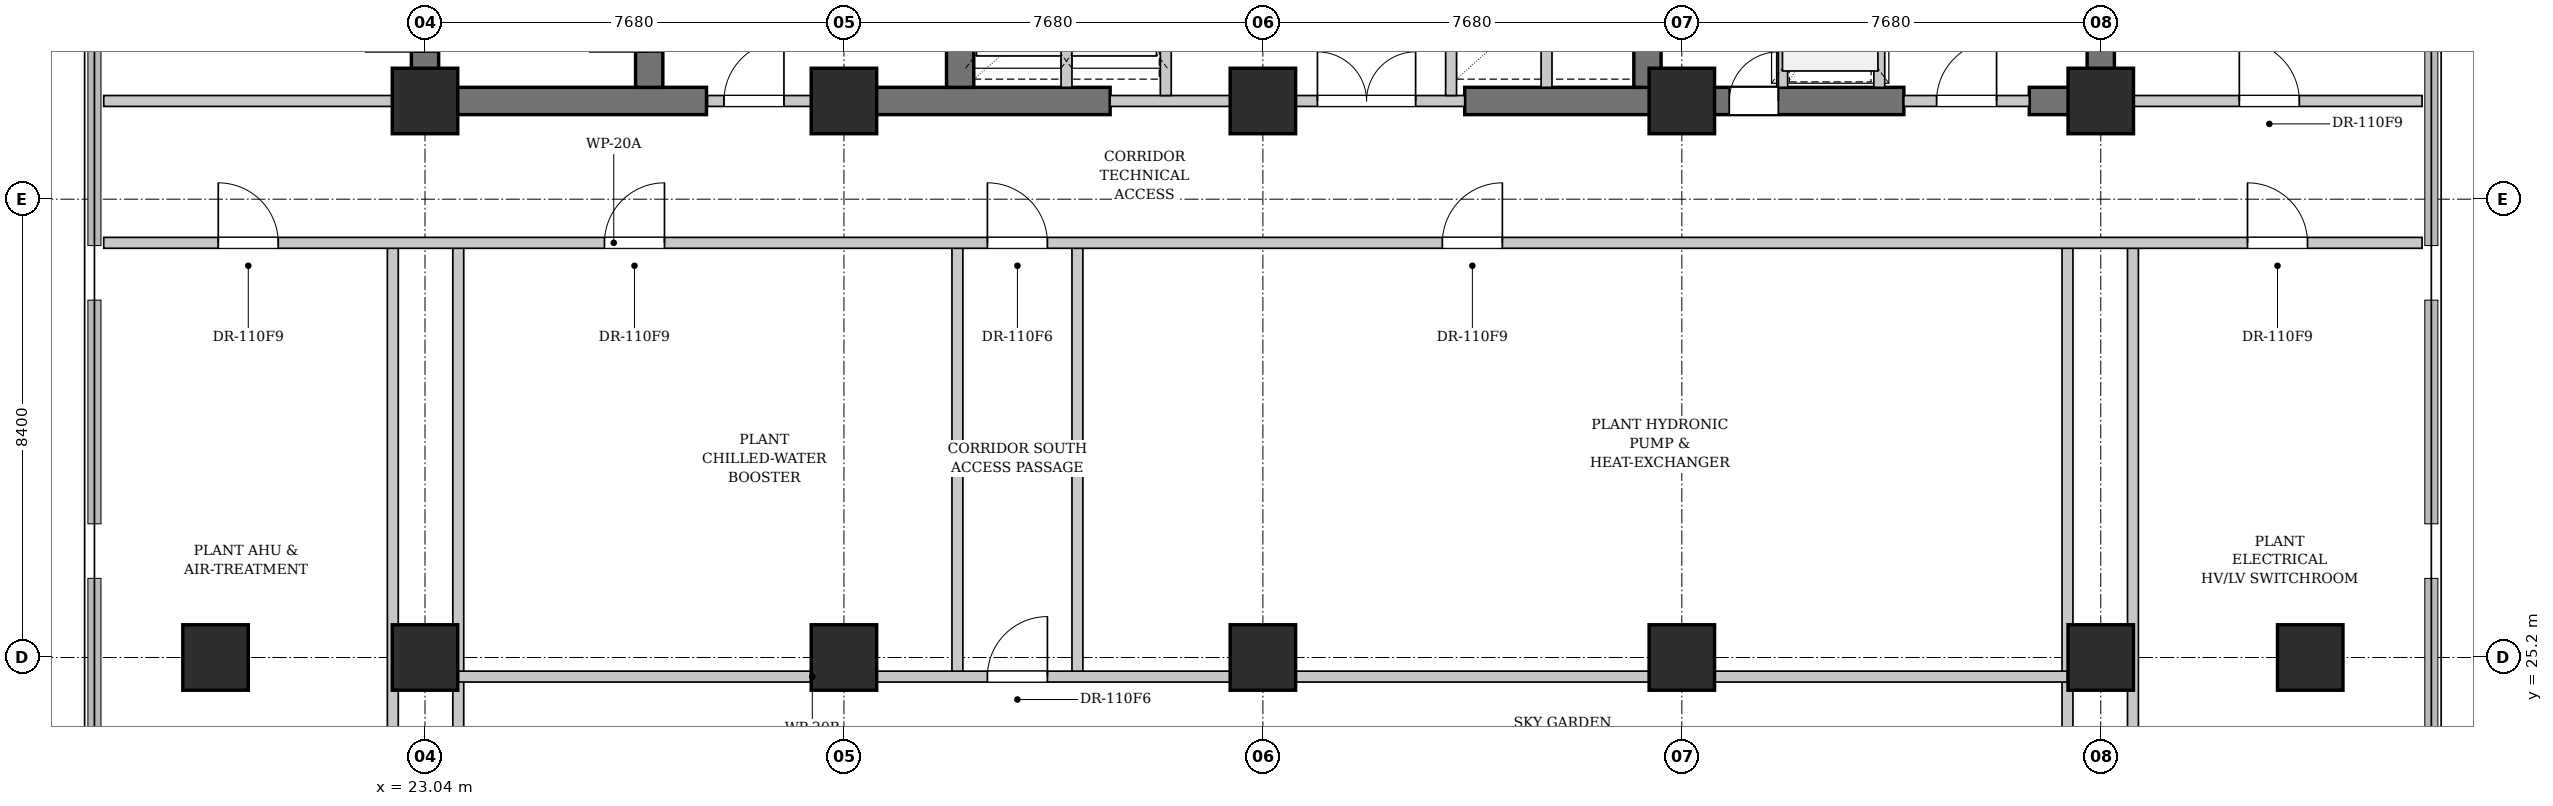
"""IFC4 building model, lengths in metres.
Left out: names, types, materials, properties, quantities, classifications, styles, units other than length and angle.
Written with IfcOpenShell. Run it as: python <this file> out.ifc"""

import sys

from ifc_helpers import new_model, si_unit, direction, frame, frame_2d, origin, origin_2d, place, context, subcontext, project, spatial, rectangle, extrude, element, fill, save


model = new_model("IFC4")
c1 = context("Model", 3, precision=1e-05, world=origin(), true_north=direction((0.0, 1.0)))
c2 = subcontext(c1, "Body", "Model", "MODEL_VIEW")
j1 = project(units=[si_unit("LENGTHUNIT", "METRE"), si_unit("PLANEANGLEUNIT", "RADIAN")], contexts=[c1])
p1 = place(None, origin())
s1 = spatial("IfcSite", under=j1, at=p1, CompositionType="ELEMENT")
p2 = place(p1, origin())
s2 = spatial("IfcBuilding", under=s1, at=p2, CompositionType="ELEMENT")
p3 = place(p2, frame((0.0, 0.0, 78.0)))
s3 = spatial("IfcBuildingStorey", under=s2, at=p3, CompositionType="ELEMENT", Elevation=78.0)
p4 = place(p3, frame((22.79, 35.4, 0.0), z_axis=(0.0, 0.0, 1.0), x_axis=(1.0, 0.0, 0.0)))
e1 = element("IfcWall", 1, at=p4, inside=s3, PredefinedType="SHEAR", context=c2, shape_type="SweptSolid", body=[
    extrude(rectangle(XDim=5.41, YDim=0.5, at=frame_2d((2.705, 0.0))), origin(), (0.0, 0.0, 1.0), 3.68),
])
p5 = place(p3, frame((30.72, 35.4, 0.0), z_axis=(0.0, 0.0, 1.0), x_axis=(1.0, 0.0, 0.0)))
e2 = element("IfcWall", 2, at=p5, inside=s3, PredefinedType="SHEAR", context=c2, shape_type="SweptSolid", body=[
    extrude(rectangle(XDim=4.88, YDim=0.5, at=frame_2d((2.44, 0.0))), origin(), (0.0, 0.0, 1.0), 3.68),
])
p6 = place(p3, frame((42.1, 35.4, 0.0), z_axis=(0.0, 0.0, 1.0), x_axis=(1.0, 0.0, 0.0)))
e3 = element("IfcWall", 3, at=p6, inside=s3, PredefinedType="SHEAR", context=c2, shape_type="SweptSolid", body=[
    extrude(rectangle(XDim=8.05, YDim=0.5, at=frame_2d((4.025, 0.0))), origin(), (0.0, 0.0, 1.0), 3.68),
])
p7 = place(p6, frame((4.85, 0.0, 0.0)))
e4 = element("IfcOpeningElement", 4, at=p7, cuts=e3, PredefinedType="OPENING", context=c2, shape_type="SweptSolid", body=[
    extrude(rectangle(XDim=0.9, YDim=2.15, at=frame_2d((0.45, 1.075))), frame((0.0, 0.26, 0.0), z_axis=(0.0, -1.0, 0.0), x_axis=(1.0, 0.0, 0.0)), (0.0, 0.0, 1.0), 0.52),
])
p8 = place(p3, frame((52.45, 35.4, 0.0), z_axis=(0.0, 0.0, 1.0), x_axis=(1.0, 0.0, 0.0)))
e5 = element("IfcWall", 5, at=p8, inside=s3, PredefinedType="SHEAR", context=c2, shape_type="SweptSolid", body=[
    extrude(rectangle(XDim=1.56, YDim=0.5, at=frame_2d((0.78, 0.0))), origin(), (0.0, 0.0, 1.0), 3.68),
])
p9 = place(p3, frame((23.04, 35.65, 0.0), z_axis=(0.0, 0.0, 1.0), x_axis=(0.0, 1.0, 0.0)))
e6 = element("IfcWall", 6, at=p9, inside=s3, PredefinedType="SHEAR", context=c2, shape_type="SweptSolid", body=[
    extrude(rectangle(XDim=10.3, YDim=0.5, at=frame_2d((5.15, 0.0))), origin(), (0.0, 0.0, 1.0), 3.68),
])
p10 = place(p9, frame((0.65, 0.0, 0.0)))
e7 = element("IfcOpeningElement", 7, at=p10, cuts=e6, PredefinedType="OPENING", context=c2, shape_type="SweptSolid", body=[
    extrude(rectangle(XDim=1.1, YDim=2.15, at=frame_2d((0.55, 1.075))), frame((0.0, 0.26, 0.0), z_axis=(0.0, -1.0, 0.0), x_axis=(1.0, 0.0, 0.0)), (0.0, 0.0, 1.0), 0.52),
])
p11 = place(p3, frame((27.15, 35.65, 0.0), z_axis=(0.0, 0.0, 1.0), x_axis=(0.0, 1.0, 0.0)))
e8 = element("IfcWall", 8, at=p11, inside=s3, PredefinedType="SHEAR", context=c2, shape_type="SweptSolid", body=[
    extrude(rectangle(XDim=10.3, YDim=0.5, at=frame_2d((5.15, 0.0))), origin(), (0.0, 0.0, 1.0), 3.68),
])
p12 = place(p11, frame((0.65, 0.0, 0.0)))
e9 = element("IfcOpeningElement", 9, at=p12, cuts=e8, PredefinedType="OPENING", context=c2, shape_type="SweptSolid", body=[
    extrude(rectangle(XDim=1.1, YDim=2.15, at=frame_2d((0.55, 1.075))), frame((0.0, 0.26, 0.0), z_axis=(0.0, -1.0, 0.0), x_axis=(1.0, 0.0, 0.0)), (0.0, 0.0, 1.0), 0.52),
])
for number, where, z_axis, x_axis in (
    (10, (32.85, 35.65, 0.0), (0.0, 0.0, 1.0), (0.0, 1.0, 0.0)),
    (11, (45.45, 35.65, 0.0), (0.0, 0.0, 1.0), (0.0, 1.0, 0.0)),
    (12, (53.76, 35.65, 0.0), (0.0, 0.0, 1.0), (0.0, 1.0, 0.0)),
):
    element("IfcWall", number, at=place(p3, frame(where, z_axis=z_axis, x_axis=x_axis)), inside=s3, PredefinedType="SHEAR", context=c2, shape_type="SweptSolid", body=[
        extrude(rectangle(XDim=10.3, YDim=0.5, at=frame_2d((5.15, 0.0))), origin(), (0.0, 0.0, 1.0), 3.68),
    ])
for number, where, z_axis, x_axis in (
    (13, (23.04, 35.4, 0.0), (0.0, 0.0, 1.0), (1.0, 0.0, 0.0)),
    (14, (23.04, 25.2, 0.0), (0.0, 0.0, 1.0), (1.0, 0.0, 0.0)),
    (15, (30.72, 35.4, 0.0), (0.0, 0.0, 1.0), (1.0, 0.0, 0.0)),
    (16, (30.72, 25.2, 0.0), (0.0, 0.0, 1.0), (1.0, 0.0, 0.0)),
    (17, (38.4, 35.4, 0.0), (0.0, 0.0, 1.0), (1.0, 0.0, 0.0)),
    (18, (38.4, 25.2, 0.0), (0.0, 0.0, 1.0), (1.0, 0.0, 0.0)),
    (19, (46.08, 35.4, 0.0), (0.0, 0.0, 1.0), (1.0, 0.0, 0.0)),
    (20, (46.08, 25.2, 0.0), (0.0, 0.0, 1.0), (1.0, 0.0, 0.0)),
    (21, (53.76, 35.4, 0.0), (0.0, 0.0, 1.0), (1.0, 0.0, 0.0)),
    (22, (53.76, 25.2, 0.0), (0.0, 0.0, 1.0), (1.0, 0.0, 0.0)),
    (23, (19.2, 25.2, 0.0), (0.0, 0.0, 1.0), (1.0, 0.0, 0.0)),
    (24, (57.6, 25.2, 0.0), (0.0, 0.0, 1.0), (1.0, 0.0, 0.0)),
):
    element("IfcColumn", number, at=place(p3, frame(where, z_axis=z_axis, x_axis=x_axis)), inside=s3, PredefinedType="COLUMN", context=c2, shape_type="SweptSolid", body=[
        extrude(rectangle(XDim=1.2, YDim=1.2, at=origin_2d()), origin(), (0.0, 0.0, 1.0), 3.9),
    ])
p13 = place(p3, frame((28.22, 35.4, 0.0), z_axis=(0.0, 0.0, 1.0), x_axis=(1.0, 0.0, 0.0)))
e25 = element("IfcWall", 25, at=p13, inside=s3, PredefinedType="PARTITIONING", context=c2, shape_type="SweptSolid", body=[
    extrude(rectangle(XDim=2.5, YDim=0.2, at=frame_2d((1.25, 0.0))), origin(), (0.0, 0.0, 1.0), 2.765),
])
p14 = place(p13, frame((0.3, 0.0, 0.0)))
e26 = element("IfcOpeningElement", 26, at=p14, cuts=e25, PredefinedType="OPENING", context=c2, shape_type="SweptSolid", body=[
    extrude(rectangle(XDim=1.1, YDim=2.15, at=frame_2d((0.55, 1.075))), frame((0.0, 0.11, 0.0), z_axis=(0.0, -1.0, 0.0), x_axis=(1.0, 0.0, 0.0)), (0.0, 0.0, 1.0), 0.22),
])
p15 = place(p3, frame((35.6, 35.4, 0.0), z_axis=(0.0, 0.0, 1.0), x_axis=(1.0, 0.0, 0.0)))
e27 = element("IfcWall", 27, at=p15, inside=s3, PredefinedType="PARTITIONING", context=c2, shape_type="SweptSolid", body=[
    extrude(rectangle(XDim=6.5, YDim=0.2, at=frame_2d((3.25, 0.0))), origin(), (0.0, 0.0, 1.0), 2.765),
])
p16 = place(p15, frame((3.8, 0.0, 0.0)))
e28 = element("IfcOpeningElement", 28, at=p16, cuts=e27, PredefinedType="OPENING", context=c2, shape_type="SweptSolid", body=[
    extrude(rectangle(XDim=1.8, YDim=2.3, at=frame_2d((0.9, 1.15))), frame((0.0, 0.11, 0.0), z_axis=(0.0, -1.0, 0.0), x_axis=(1.0, 0.0, 0.0)), (0.0, 0.0, 1.0), 0.22),
])
p17 = place(p3, frame((34.8, 35.65, 0.0), z_axis=(0.0, 0.0, 1.0), x_axis=(0.0, 1.0, 0.0)))
e29 = element("IfcWall", 29, at=p17, inside=s3, PredefinedType="PARTITIONING", context=c2, shape_type="SweptSolid", body=[
    extrude(rectangle(XDim=3.25, YDim=0.2, at=frame_2d((1.625, 0.0))), origin(), (0.0, 0.0, 1.0), 3.68),
])
p18 = place(p3, frame((36.62, 35.5, 0.0), z_axis=(0.0, 0.0, 1.0), x_axis=(0.0, 1.0, 0.0)))
e30 = element("IfcWall", 30, at=p18, inside=s3, PredefinedType="PARTITIONING", context=c2, shape_type="SweptSolid", body=[
    extrude(rectangle(XDim=3.4, YDim=0.2, at=frame_2d((1.7, 0.0))), origin(), (0.0, 0.0, 1.0), 3.68),
])
p19 = place(p3, frame((43.6, 35.65, 0.0), z_axis=(0.0, 0.0, 1.0), x_axis=(0.0, 1.0, 0.0)))
e31 = element("IfcWall", 31, at=p19, inside=s3, PredefinedType="PARTITIONING", context=c2, shape_type="SweptSolid", body=[
    extrude(rectangle(XDim=3.25, YDim=0.2, at=frame_2d((1.625, 0.0))), origin(), (0.0, 0.0, 1.0), 3.68),
])
p20 = place(p3, frame((41.85, 35.5, 0.0), z_axis=(0.0, 0.0, 1.0), x_axis=(0.0, 1.0, 0.0)))
e32 = element("IfcWall", 32, at=p20, inside=s3, PredefinedType="PARTITIONING", context=c2, shape_type="SweptSolid", body=[
    extrude(rectangle(XDim=3.4, YDim=0.2, at=frame_2d((1.7, 0.0))), origin(), (0.0, 0.0, 1.0), 3.68),
])
p21 = place(p3, frame((50.15, 35.4, 0.0), z_axis=(0.0, 0.0, 1.0), x_axis=(1.0, 0.0, 0.0)))
e33 = element("IfcWall", 33, at=p21, inside=s3, PredefinedType="PARTITIONING", context=c2, shape_type="SweptSolid", body=[
    extrude(rectangle(XDim=2.3, YDim=0.2, at=frame_2d((1.15, 0.0))), origin(), (0.0, 0.0, 1.0), 2.765),
])
p22 = place(p21, frame((0.6, 0.0, 0.0)))
e34 = element("IfcOpeningElement", 34, at=p22, cuts=e33, PredefinedType="OPENING", context=c2, shape_type="SweptSolid", body=[
    extrude(rectangle(XDim=1.1, YDim=2.15, at=frame_2d((0.55, 1.075))), frame((0.0, 0.11, 0.0), z_axis=(0.0, -1.0, 0.0), x_axis=(1.0, 0.0, 0.0)), (0.0, 0.0, 1.0), 0.22),
])
p23 = place(p3, frame((49.7, 35.65, 0.0), z_axis=(0.0, 0.0, 1.0), x_axis=(0.0, 1.0, 0.0)))
e35 = element("IfcWall", 35, at=p23, inside=s3, PredefinedType="PARTITIONING", context=c2, shape_type="SweptSolid", body=[
    extrude(rectangle(XDim=3.15, YDim=0.2, at=frame_2d((1.575, 0.0))), origin(), (0.0, 0.0, 1.0), 3.68),
])
p24 = place(p23, frame((0.85, 0.0, 0.0)))
e36 = element("IfcOpeningElement", 36, at=p24, cuts=e35, PredefinedType="OPENING", context=c2, shape_type="SweptSolid", body=[
    extrude(rectangle(XDim=1.2, YDim=2.2, at=frame_2d((0.6, 1.1))), frame((0.0, 0.11, 0.0), z_axis=(0.0, -1.0, 0.0), x_axis=(1.0, 0.0, 0.0)), (0.0, 0.0, 1.0), 0.22),
])
p25 = place(p3, frame((47.92, 35.65, 0.0), z_axis=(0.0, 0.0, 1.0), x_axis=(0.0, 1.0, 0.0)))
e37 = element("IfcWall", 37, at=p25, inside=s3, PredefinedType="PARTITIONING", context=c2, shape_type="SweptSolid", body=[
    extrude(rectangle(XDim=3.15, YDim=0.2, at=frame_2d((1.575, 0.0))), origin(), (0.0, 0.0, 1.0), 3.68),
])
p26 = place(p3, frame((17.15, 35.4, 0.0), z_axis=(0.0, 0.0, 1.0), x_axis=(1.0, 0.0, 0.0)))
e38 = element("IfcWall", 38, at=p26, inside=s3, PredefinedType="PARTITIONING", context=c2, shape_type="SweptSolid", body=[
    extrude(rectangle(XDim=5.6, YDim=0.2, at=frame_2d((2.8, 0.0))), origin(), (0.0, 0.0, 1.0), 3.68),
])
p27 = place(p3, frame((54.05, 35.4, 0.0), z_axis=(0.0, 0.0, 1.0), x_axis=(1.0, 0.0, 0.0)))
e39 = element("IfcWall", 39, at=p27, inside=s3, PredefinedType="PARTITIONING", context=c2, shape_type="SweptSolid", body=[
    extrude(rectangle(XDim=5.6, YDim=0.2, at=frame_2d((2.8, 0.0))), origin(), (0.0, 0.0, 1.0), 3.68),
])
p28 = place(p27, frame((2.25, 0.0, 0.0)))
e40 = element("IfcOpeningElement", 40, at=p28, cuts=e39, PredefinedType="OPENING", context=c2, shape_type="SweptSolid", body=[
    extrude(rectangle(XDim=1.1, YDim=2.15, at=frame_2d((0.55, 1.075))), frame((0.0, 0.11, 0.0), z_axis=(0.0, -1.0, 0.0), x_axis=(1.0, 0.0, 0.0)), (0.0, 0.0, 1.0), 0.22),
])
for number, where, z_axis, x_axis in (
    (41, (22.45, 22.38, 0.0), (0.0, 0.0, 1.0), (0.0, 1.0, 0.0)),
    (42, (23.65, 22.38, 0.0), (0.0, 0.0, 1.0), (0.0, 1.0, 0.0)),
    (43, (53.15, 22.38, 0.0), (0.0, 0.0, 1.0), (0.0, 1.0, 0.0)),
    (44, (54.35, 22.38, 0.0), (0.0, 0.0, 1.0), (0.0, 1.0, 0.0)),
):
    element("IfcWall", number, at=place(p3, frame(where, z_axis=z_axis, x_axis=x_axis)), inside=s3, PredefinedType="PARTITIONING", context=c2, shape_type="SweptSolid", body=[
        extrude(rectangle(XDim=10.42, YDim=0.2, at=frame_2d((5.21, 0.0))), origin(), (0.0, 0.0, 1.0), 3.68),
    ])
for number, where, z_axis, x_axis in (
    (45, (32.8, 24.85, 0.0), (0.0, 0.0, 1.0), (0.0, 1.0, 0.0)),
    (46, (35.0, 24.85, 0.0), (0.0, 0.0, 1.0), (0.0, 1.0, 0.0)),
):
    element("IfcWall", number, at=place(p3, frame(where, z_axis=z_axis, x_axis=x_axis)), inside=s3, PredefinedType="PARTITIONING", context=c2, shape_type="SweptSolid", body=[
        extrude(rectangle(XDim=7.95, YDim=0.2, at=frame_2d((3.975, 0.0))), origin(), (0.0, 0.0, 1.0), 3.68),
    ])
p29 = place(p3, frame((23.65, 24.85, 0.0), z_axis=(0.0, 0.0, 1.0), x_axis=(1.0, 0.0, 0.0)))
e47 = element("IfcWall", 47, at=p29, inside=s3, PredefinedType="PARTITIONING", context=c2, shape_type="SweptSolid", body=[
    extrude(rectangle(XDim=29.5, YDim=0.2, at=frame_2d((14.75, 0.0))), origin(), (0.0, 0.0, 1.0), 3.68),
])
p30 = place(p29, frame((9.7, 0.0, 0.0)))
e48 = element("IfcOpeningElement", 48, at=p30, cuts=e47, PredefinedType="OPENING", context=c2, shape_type="SweptSolid", body=[
    extrude(rectangle(XDim=1.1, YDim=2.15, at=frame_2d((0.55, 1.075))), frame((0.0, 0.11, 0.0), z_axis=(0.0, -1.0, 0.0), x_axis=(1.0, 0.0, 0.0)), (0.0, 0.0, 1.0), 0.22),
])
p31 = place(p3, frame((17.15, 32.8, 0.0), z_axis=(0.0, 0.0, 1.0), x_axis=(1.0, 0.0, 0.0)))
e49 = element("IfcWall", 49, at=p31, inside=s3, PredefinedType="PARTITIONING", context=c2, shape_type="SweptSolid", body=[
    extrude(rectangle(XDim=42.5, YDim=0.2, at=frame_2d((21.25, 0.0))), origin(), (0.0, 0.0, 1.0), 3.68),
])
p32 = place(p31, frame((2.1, 0.0, 0.0)))
e50 = element("IfcOpeningElement", 50, at=p32, cuts=e49, PredefinedType="OPENING", context=c2, shape_type="SweptSolid", body=[
    extrude(rectangle(XDim=1.1, YDim=2.15, at=frame_2d((0.55, 1.075))), frame((0.0, 0.11, 0.0), z_axis=(0.0, -1.0, 0.0), x_axis=(1.0, 0.0, 0.0)), (0.0, 0.0, 1.0), 0.22),
])
p33 = place(p31, frame((9.18, 0.0, 0.0)))
e51 = element("IfcOpeningElement", 51, at=p33, cuts=e49, PredefinedType="OPENING", context=c2, shape_type="SweptSolid", body=[
    extrude(rectangle(XDim=1.1, YDim=2.15, at=frame_2d((0.55, 1.075))), frame((0.0, 0.11, 0.0), z_axis=(0.0, -1.0, 0.0), x_axis=(1.0, 0.0, 0.0)), (0.0, 0.0, 1.0), 0.22),
])
p34 = place(p31, frame((16.2, 0.0, 0.0)))
e52 = element("IfcOpeningElement", 52, at=p34, cuts=e49, PredefinedType="OPENING", context=c2, shape_type="SweptSolid", body=[
    extrude(rectangle(XDim=1.1, YDim=2.15, at=frame_2d((0.55, 1.075))), frame((0.0, 0.11, 0.0), z_axis=(0.0, -1.0, 0.0), x_axis=(1.0, 0.0, 0.0)), (0.0, 0.0, 1.0), 0.22),
])
p35 = place(p31, frame((24.54, 0.0, 0.0)))
e53 = element("IfcOpeningElement", 53, at=p35, cuts=e49, PredefinedType="OPENING", context=c2, shape_type="SweptSolid", body=[
    extrude(rectangle(XDim=1.1, YDim=2.15, at=frame_2d((0.55, 1.075))), frame((0.0, 0.11, 0.0), z_axis=(0.0, -1.0, 0.0), x_axis=(1.0, 0.0, 0.0)), (0.0, 0.0, 1.0), 0.22),
])
p36 = place(p31, frame((39.3, 0.0, 0.0)))
e54 = element("IfcOpeningElement", 54, at=p36, cuts=e49, PredefinedType="OPENING", context=c2, shape_type="SweptSolid", body=[
    extrude(rectangle(XDim=1.1, YDim=2.15, at=frame_2d((0.55, 1.075))), frame((0.0, 0.11, 0.0), z_axis=(0.0, -1.0, 0.0), x_axis=(1.0, 0.0, 0.0)), (0.0, 0.0, 1.0), 0.22),
])
p37 = place(p14, origin())
e55 = element("IfcDoor", 55, at=p37, inside=s3, OperationType="SINGLE_SWING_RIGHT", PredefinedType="DOOR", context=c2, shape_type="SweptSolid", body=[
    extrude(rectangle(XDim=1.1, YDim=2.15, at=frame_2d((0.55, 1.075))), frame((0.0, 0.025, 0.0), z_axis=(0.0, -1.0, 0.0), x_axis=(1.0, 0.0, 0.0)), (0.0, 0.0, 1.0), 0.05),
])
fill(e26, e55)
p38 = place(p16, origin())
e56 = element("IfcDoor", 56, at=p38, inside=s3, OperationType="DOUBLE_DOOR_SINGLE_SWING", PredefinedType="DOOR", context=c2, shape_type="SweptSolid", body=[
    extrude(rectangle(XDim=1.8, YDim=2.3, at=frame_2d((0.9, 1.15))), frame((0.0, 0.025, 0.0), z_axis=(0.0, -1.0, 0.0), x_axis=(1.0, 0.0, 0.0)), (0.0, 0.0, 1.0), 0.05),
])
fill(e28, e56)
p39 = place(p22, origin())
e57 = element("IfcDoor", 57, at=p39, inside=s3, OperationType="SINGLE_SWING_RIGHT", PredefinedType="DOOR", context=c2, shape_type="SweptSolid", body=[
    extrude(rectangle(XDim=1.1, YDim=2.15, at=frame_2d((0.55, 1.075))), frame((0.0, 0.025, 0.0), z_axis=(0.0, -1.0, 0.0), x_axis=(1.0, 0.0, 0.0)), (0.0, 0.0, 1.0), 0.05),
])
fill(e34, e57)
p40 = place(p28, origin())
e58 = element("IfcDoor", 58, at=p40, inside=s3, OperationType="SINGLE_SWING_LEFT", PredefinedType="DOOR", context=c2, shape_type="SweptSolid", body=[
    extrude(rectangle(XDim=1.1, YDim=2.15, at=frame_2d((0.55, 1.075))), frame((0.0, 0.025, 0.0), z_axis=(0.0, -1.0, 0.0), x_axis=(1.0, 0.0, 0.0)), (0.0, 0.0, 1.0), 0.05),
])
fill(e40, e58)
p41 = place(p30, origin())
e59 = element("IfcDoor", 59, at=p41, inside=s3, OperationType="SINGLE_SWING_RIGHT", PredefinedType="DOOR", context=c2, shape_type="SweptSolid", body=[
    extrude(rectangle(XDim=1.1, YDim=2.15, at=frame_2d((0.55, 1.075))), frame((0.0, 0.025, 0.0), z_axis=(0.0, -1.0, 0.0), x_axis=(1.0, 0.0, 0.0)), (0.0, 0.0, 1.0), 0.05),
])
fill(e48, e59)
p42 = place(p32, origin())
e60 = element("IfcDoor", 60, at=p42, inside=s3, OperationType="SINGLE_SWING_LEFT", PredefinedType="DOOR", context=c2, shape_type="SweptSolid", body=[
    extrude(rectangle(XDim=1.1, YDim=2.15, at=frame_2d((0.55, 1.075))), frame((0.0, 0.025, 0.0), z_axis=(0.0, -1.0, 0.0), x_axis=(1.0, 0.0, 0.0)), (0.0, 0.0, 1.0), 0.05),
])
fill(e50, e60)
p43 = place(p33, origin())
e61 = element("IfcDoor", 61, at=p43, inside=s3, OperationType="SINGLE_SWING_RIGHT", PredefinedType="DOOR", context=c2, shape_type="SweptSolid", body=[
    extrude(rectangle(XDim=1.1, YDim=2.15, at=frame_2d((0.55, 1.075))), frame((0.0, 0.025, 0.0), z_axis=(0.0, -1.0, 0.0), x_axis=(1.0, 0.0, 0.0)), (0.0, 0.0, 1.0), 0.05),
])
fill(e51, e61)
p44 = place(p34, origin())
e62 = element("IfcDoor", 62, at=p44, inside=s3, OperationType="SINGLE_SWING_LEFT", PredefinedType="DOOR", context=c2, shape_type="SweptSolid", body=[
    extrude(rectangle(XDim=1.1, YDim=2.15, at=frame_2d((0.55, 1.075))), frame((0.0, 0.025, 0.0), z_axis=(0.0, -1.0, 0.0), x_axis=(1.0, 0.0, 0.0)), (0.0, 0.0, 1.0), 0.05),
])
fill(e52, e62)
p45 = place(p35, origin())
e63 = element("IfcDoor", 63, at=p45, inside=s3, OperationType="SINGLE_SWING_RIGHT", PredefinedType="DOOR", context=c2, shape_type="SweptSolid", body=[
    extrude(rectangle(XDim=1.1, YDim=2.15, at=frame_2d((0.55, 1.075))), frame((0.0, 0.025, 0.0), z_axis=(0.0, -1.0, 0.0), x_axis=(1.0, 0.0, 0.0)), (0.0, 0.0, 1.0), 0.05),
])
fill(e53, e63)
p46 = place(p36, origin())
e64 = element("IfcDoor", 64, at=p46, inside=s3, OperationType="SINGLE_SWING_LEFT", PredefinedType="DOOR", context=c2, shape_type="SweptSolid", body=[
    extrude(rectangle(XDim=1.1, YDim=2.15, at=frame_2d((0.55, 1.075))), frame((0.0, 0.025, 0.0), z_axis=(0.0, -1.0, 0.0), x_axis=(1.0, 0.0, 0.0)), (0.0, 0.0, 1.0), 0.05),
])
fill(e54, e64)
p47 = place(p7, origin())
e65 = element("IfcDoor", 65, at=p47, inside=s3, OperationType="SINGLE_SWING_RIGHT", PredefinedType="DOOR", context=c2, shape_type="SweptSolid", body=[
    extrude(rectangle(XDim=0.9, YDim=2.15, at=frame_2d((0.45, 1.075))), frame((0.0, 0.025, 0.0), z_axis=(0.0, -1.0, 0.0), x_axis=(1.0, 0.0, 0.0)), (0.0, 0.0, 1.0), 0.05),
])
fill(e4, e65)
save(model, sys.argv[1])
